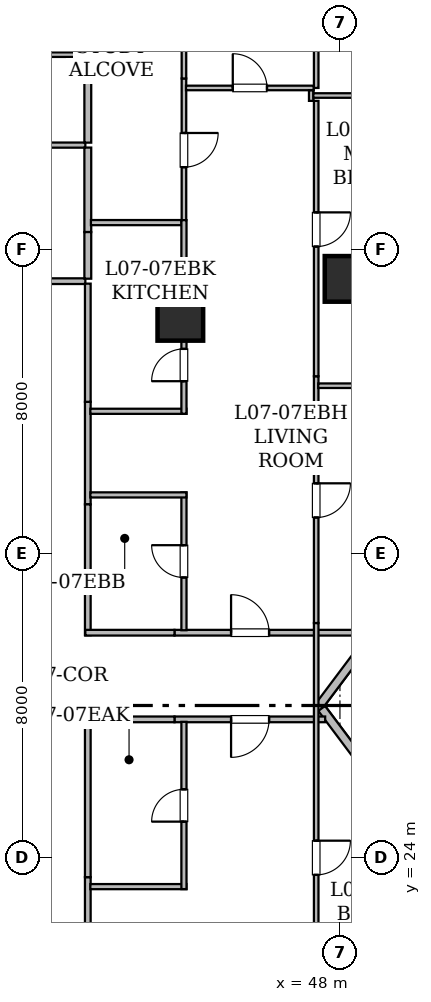
"""IFC4 building model, lengths in metres.
Left out: names, types, materials, properties, quantities, classifications, styles, units other than length and angle.
Written with IfcOpenShell. Run it as: python <this file> out.ifc"""

import sys

from ifc_helpers import new_model, si_unit, direction, frame, frame_2d, origin, origin_2d, place, context, subcontext, project, spatial, rectangle, hollow_rectangle, extrude, element, fill, save


model = new_model("IFC4")
c1 = context("Model", 3, precision=1e-05, world=origin(), true_north=direction((0.0, 1.0)))
c2 = subcontext(c1, "Body", "Model", "MODEL_VIEW")
j1 = project(units=[si_unit("LENGTHUNIT", "METRE"), si_unit("PLANEANGLEUNIT", "RADIAN")], contexts=[c1])
p1 = place(None, origin())
s1 = spatial("IfcSite", under=j1, at=p1, CompositionType="ELEMENT")
p2 = place(p1, origin())
s2 = spatial("IfcBuilding", under=s1, at=p2, CompositionType="ELEMENT")
p3 = place(p2, frame((0.0, 0.0, 33.3)))
s3 = spatial("IfcBuildingStorey", under=s2, at=p3, CompositionType="ELEMENT", Elevation=33.3)
for number, where, z_axis, x_axis in (
    (1, (48.2, 39.225, 0.025), (0.0, 0.0, 1.0), (1.0, 0.0, 0.0)),
    (2, (43.8, 38.2, 0.025), (0.0, 0.0, 1.0), (1.0, 0.0, 0.0)),
):
    element("IfcColumn", number, at=place(p3, frame(where, z_axis=z_axis, x_axis=x_axis)), inside=s3, PredefinedType="COLUMN", context=c2, shape_type="SweptSolid", body=[
        extrude(hollow_rectangle(XDim=1.2, YDim=1.2, WallThickness=0.06, at=origin_2d()), origin(), (0.0, 0.0, 1.0), 3.625),
    ])
p4 = place(p3, frame((49.856, 31.191, 0.0), z_axis=(0.0, 0.0, 1.0), x_axis=(-0.600137081448, -0.799897170561, 0.0)))
e3 = element("IfcWall", 3, at=p4, inside=s3, PredefinedType="STANDARD", context=c2, shape_type="SweptSolid", body=[
    extrude(rectangle(XDim=3.989, YDim=0.22, at=frame_2d((1.995, 0.0))), origin(), (0.0, 0.0, 1.0), 3.43),
])
p5 = place(p3, frame((47.519, 27.923, 0.0), z_axis=(0.0, 0.0, 1.0), x_axis=(0.600118645218, -0.799911002338, 0.0)))
e4 = element("IfcWall", 4, at=p5, inside=s3, PredefinedType="STANDARD", context=c2, shape_type="SweptSolid", body=[
    extrude(rectangle(XDim=3.951, YDim=0.22, at=frame_2d((1.975, 0.0))), origin(), (0.0, 0.0, 1.0), 3.43),
])
p6 = place(p3, frame((34.299, 39.165, 0.0), z_axis=(0.0, 0.0, 1.0), x_axis=(1.0, 0.0, 0.0)))
e5 = element("IfcWall", 5, at=p6, inside=s3, PredefinedType="STANDARD", context=c2, shape_type="SweptSolid", body=[
    extrude(rectangle(XDim=7.001, YDim=0.15, at=frame_2d((3.5, 0.0))), origin(), (0.0, 0.0, 1.0), 3.43),
])
p7 = place(p3, frame((47.611, 27.635, 0.0), z_axis=(0.0, 0.0, 1.0), x_axis=(-1.0, 0.0, 0.0)))
e6 = element("IfcWall", 6, at=p7, inside=s3, PredefinedType="STANDARD", context=c2, shape_type="SweptSolid", body=[
    extrude(rectangle(XDim=3.965, YDim=0.15, at=frame_2d((1.982, 0.0))), origin(), (0.0, 0.0, 1.0), 2.647),
])
p8 = place(p7, frame((1.476, 0.0, 0.0)))
e7 = element("IfcOpeningElement", 7, at=p8, cuts=e6, PredefinedType="OPENING", context=c2, shape_type="SweptSolid", body=[
    extrude(rectangle(XDim=1.0, YDim=2.15, at=frame_2d((0.5, 1.075))), frame((0.0, 0.085, 0.0), z_axis=(0.0, -1.0, 0.0), x_axis=(1.0, 0.0, 0.0)), (0.0, 0.0, 1.0), 0.17),
])
p9 = place(p3, frame((41.365, 23.483, 0.0), z_axis=(0.0, 0.0, 1.0), x_axis=(0.0, -1.0, 0.0)))
e8 = element("IfcWall", 8, at=p9, inside=s3, PredefinedType="STANDARD", context=c2, shape_type="SweptSolid", body=[
    extrude(rectangle(XDim=2.698, YDim=0.15, at=frame_2d((1.349, 0.0))), origin(), (0.0, 0.0, 1.0), 3.43),
])
p10 = place(p3, frame((43.646, 27.635, 0.0), z_axis=(0.0, 0.0, 1.0), x_axis=(-1.0, 0.0, 0.0)))
e9 = element("IfcWall", 9, at=p10, inside=s3, PredefinedType="STANDARD", context=c2, shape_type="SweptSolid", body=[
    extrude(rectangle(XDim=2.346, YDim=0.15, at=frame_2d((1.173, 0.0))), origin(), (0.0, 0.0, 1.0), 2.647),
])
p11 = place(p3, frame((41.365, 27.698, 0.0), z_axis=(0.0, 0.0, 1.0), x_axis=(0.0, -1.0, 0.0)))
e10 = element("IfcWall", 10, at=p11, inside=s3, PredefinedType="STANDARD", context=c2, shape_type="SweptSolid", body=[
    extrude(rectangle(XDim=4.215, YDim=0.15, at=frame_2d((2.107, 0.0))), origin(), (0.0, 0.0, 1.0), 2.957),
])
p12 = place(p3, frame((41.365, 35.99, 0.0), z_axis=(0.0, 0.0, 1.0), x_axis=(0.0, -1.0, 0.0)))
e11 = element("IfcWall", 11, at=p12, inside=s3, PredefinedType="STANDARD", context=c2, shape_type="SweptSolid", body=[
    extrude(rectangle(XDim=2.698, YDim=0.15, at=frame_2d((1.349, 0.0))), origin(), (0.0, 0.0, 1.0), 3.43),
])
p13 = place(p3, frame((43.646, 29.915, 0.0), z_axis=(0.0, 0.0, 1.0), x_axis=(1.0, 0.0, 0.0)))
e12 = element("IfcWall", 12, at=p13, inside=s3, PredefinedType="STANDARD", context=c2, shape_type="SweptSolid", body=[
    extrude(rectangle(XDim=5.125, YDim=0.15, at=frame_2d((2.562, 0.0))), origin(), (0.0, 0.0, 1.0), 2.647),
])
p14 = place(p13, frame((1.489, 0.0, 0.0)))
e13 = element("IfcOpeningElement", 13, at=p14, cuts=e12, PredefinedType="OPENING", context=c2, shape_type="SweptSolid", body=[
    extrude(rectangle(XDim=1.0, YDim=2.15, at=frame_2d((0.5, 1.075))), frame((0.0, 0.085, 0.0), z_axis=(0.0, -1.0, 0.0), x_axis=(1.0, 0.0, 0.0)), (0.0, 0.0, 1.0), 0.17),
])
p15 = place(p3, frame((41.365, 33.292, 0.0), z_axis=(0.0, 0.0, 1.0), x_axis=(0.0, -1.0, 0.0)))
e14 = element("IfcWall", 14, at=p15, inside=s3, PredefinedType="STANDARD", context=c2, shape_type="SweptSolid", body=[
    extrude(rectangle(XDim=3.442, YDim=0.15, at=frame_2d((1.721, 0.0))), origin(), (0.0, 0.0, 1.0), 3.43),
])
p16 = place(p3, frame((41.3, 29.915, 0.0), z_axis=(0.0, 0.0, 1.0), x_axis=(1.0, 0.0, 0.0)))
e15 = element("IfcWall", 15, at=p16, inside=s3, PredefinedType="STANDARD", context=c2, shape_type="SweptSolid", body=[
    extrude(rectangle(XDim=2.346, YDim=0.15, at=frame_2d((1.173, 0.0))), origin(), (0.0, 0.0, 1.0), 2.647),
])
p17 = place(p3, frame((41.365, 39.1, 0.0), z_axis=(0.0, 0.0, 1.0), x_axis=(0.0, -1.0, 0.0)))
e16 = element("IfcWall", 16, at=p17, inside=s3, PredefinedType="STANDARD", context=c2, shape_type="SweptSolid", body=[
    extrude(rectangle(XDim=3.11, YDim=0.15, at=frame_2d((1.555, 0.0))), origin(), (0.0, 0.0, 1.0), 2.647),
])
p18 = place(p3, frame((41.3, 42.745, 0.0), z_axis=(0.0, 0.0, 1.0), x_axis=(-1.0, 0.0, 0.0)))
e17 = element("IfcWall", 17, at=p18, inside=s3, PredefinedType="PARTITIONING", context=c2, shape_type="SweptSolid", body=[
    extrude(rectangle(XDim=7.315, YDim=0.135, at=frame_2d((3.657, 0.0))), origin(), (0.0, 0.0, 1.0), 2.957),
])
p19 = place(p18, frame((3.233, 0.0, 0.0)))
e18 = element("IfcOpeningElement", 18, at=p19, cuts=e17, PredefinedType="OPENING", context=c2, shape_type="SweptSolid", body=[
    extrude(rectangle(XDim=0.85, YDim=2.1, at=frame_2d((0.425, 1.05))), frame((0.0, 0.077, 0.0), z_axis=(0.0, -1.0, 0.0), x_axis=(1.0, 0.0, 0.0)), (0.0, 0.0, 1.0), 0.155),
])
p20 = place(p3, frame((34.82, 45.125, 0.0), z_axis=(0.0, 0.0, 1.0), x_axis=(1.0, 0.0, 0.0)))
e19 = element("IfcWall", 19, at=p20, inside=s3, PredefinedType="PARTITIONING", context=c2, shape_type="SweptSolid", body=[
    extrude(rectangle(XDim=6.48, YDim=0.12, at=frame_2d((3.24, 0.0))), origin(), (0.0, 0.0, 1.0), 3.43),
])
p21 = place(p3, frame((41.365, 45.06, 0.0), z_axis=(0.0, 0.0, 1.0), x_axis=(0.0, -1.0, 0.0)))
e20 = element("IfcWall", 20, at=p21, inside=s3, PredefinedType="STANDARD", context=c2, shape_type="SweptSolid", body=[
    extrude(rectangle(XDim=2.25, YDim=0.18, at=frame_2d((1.125, 0.0))), origin(), (0.0, 0.0, 1.0), 3.43),
])
p22 = place(p3, frame((41.365, 42.68, 0.0), z_axis=(0.0, 0.0, 1.0), x_axis=(0.0, -1.0, 0.0)))
e21 = element("IfcWall", 21, at=p22, inside=s3, PredefinedType="STANDARD", context=c2, shape_type="SweptSolid", body=[
    extrude(rectangle(XDim=2.223, YDim=0.18, at=frame_2d((1.111, 0.0))), origin(), (0.0, 0.0, 1.0), 2.957),
])
p23 = place(p3, frame((41.365, 40.457, 0.0), z_axis=(0.0, 0.0, 1.0), x_axis=(0.0, -1.0, 0.0)))
e22 = element("IfcWall", 22, at=p23, inside=s3, PredefinedType="STANDARD", context=c2, shape_type="SweptSolid", body=[
    extrude(rectangle(XDim=1.227, YDim=0.18, at=frame_2d((0.614, 0.0))), origin(), (0.0, 0.0, 1.0), 3.43),
])
p24 = place(p3, frame((41.432, 23.234, 0.0), z_axis=(0.0, 0.0, 1.0), x_axis=(1.0, 0.0, 0.0)))
e23 = element("IfcWall", 23, at=p24, inside=s3, PredefinedType="PARTITIONING", context=c2, shape_type="SweptSolid", body=[
    extrude(rectangle(XDim=2.528, YDim=0.135, at=frame_2d((1.264, 0.0))), origin(), (0.0, 0.0, 1.0), 2.647),
])
p25 = place(p3, frame((43.895, 23.169, 0.0), z_axis=(0.0, 0.0, 1.0), x_axis=(0.0, 1.0, 0.0)))
e24 = element("IfcWall", 24, at=p25, inside=s3, PredefinedType="PARTITIONING", context=c2, shape_type="SweptSolid", body=[
    extrude(rectangle(XDim=4.401, YDim=0.135, at=frame_2d((2.201, 0.0))), origin(), (0.0, 0.0, 1.0), 2.647),
])
p26 = place(p25, frame((1.775, 0.0, 0.0)))
e25 = element("IfcOpeningElement", 25, at=p26, cuts=e24, PredefinedType="OPENING", context=c2, shape_type="SweptSolid", body=[
    extrude(rectangle(XDim=0.85, YDim=2.1, at=frame_2d((0.425, 1.05))), frame((0.0, 0.077, 0.0), z_axis=(0.0, -1.0, 0.0), x_axis=(1.0, 0.0, 0.0)), (0.0, 0.0, 1.0), 0.155),
])
p27 = place(p3, frame((47.375, 30.17, 0.0), z_axis=(0.0, 0.0, 1.0), x_axis=(0.0, -1.0, 0.0)))
e26 = element("IfcWall", 26, at=p27, inside=s3, PredefinedType="PARTITIONING", context=c2, shape_type="SweptSolid", body=[
    extrude(rectangle(XDim=10.026, YDim=0.12, at=frame_2d((5.013, 0.0))), origin(), (0.0, 0.0, 1.0), 2.957),
])
p28 = place(p27, frame((5.727, 0.0, 0.0)))
e27 = element("IfcOpeningElement", 27, at=p28, cuts=e26, PredefinedType="OPENING", context=c2, shape_type="SweptSolid", body=[
    extrude(rectangle(XDim=0.9, YDim=2.1, at=frame_2d((0.45, 1.05))), frame((0.0, 0.07, 0.0), z_axis=(0.0, -1.0, 0.0), x_axis=(1.0, 0.0, 0.0)), (0.0, 0.0, 1.0), 0.14),
])
p29 = place(p3, frame((43.895, 44.498, 0.0), z_axis=(0.0, 0.0, 1.0), x_axis=(0.0, -1.0, 0.0)))
e28 = element("IfcWall", 28, at=p29, inside=s3, PredefinedType="PARTITIONING", context=c2, shape_type="SweptSolid", body=[
    extrude(rectangle(XDim=3.727, YDim=0.12, at=frame_2d((1.864, 0.0))), origin(), (0.0, 0.0, 1.0), 2.647),
])
p30 = place(p29, frame((1.434, 0.0, 0.0)))
e29 = element("IfcOpeningElement", 29, at=p30, cuts=e28, PredefinedType="OPENING", context=c2, shape_type="SweptSolid", body=[
    extrude(rectangle(XDim=0.9, YDim=2.1, at=frame_2d((0.45, 1.05))), frame((0.0, 0.07, 0.0), z_axis=(0.0, -1.0, 0.0), x_axis=(1.0, 0.0, 0.0)), (0.0, 0.0, 1.0), 0.14),
])
p31 = place(p3, frame((43.895, 52.788, 0.0), z_axis=(0.0, 0.0, 1.0), x_axis=(0.0, -1.0, 0.0)))
e30 = element("IfcWall", 30, at=p31, inside=s3, PredefinedType="PARTITIONING", context=c2, shape_type="SweptSolid", body=[
    extrude(rectangle(XDim=8.29, YDim=0.12, at=frame_2d((4.145, 0.0))), origin(), (0.0, 0.0, 1.0), 2.647),
])
p32 = place(p31, frame((3.695, 0.0, 0.0)))
e31 = element("IfcOpeningElement", 31, at=p32, cuts=e30, PredefinedType="OPENING", context=c2, shape_type="SweptSolid", body=[
    extrude(rectangle(XDim=0.9, YDim=2.1, at=frame_2d((0.45, 1.05))), frame((0.0, 0.07, 0.0), z_axis=(0.0, -1.0, 0.0), x_axis=(1.0, 0.0, 0.0)), (0.0, 0.0, 1.0), 0.14),
])
p33 = place(p3, frame((43.83, 40.706, 0.0), z_axis=(0.0, 0.0, 1.0), x_axis=(-1.0, 0.0, 0.0)))
e32 = element("IfcWall", 32, at=p33, inside=s3, PredefinedType="PARTITIONING", context=c2, shape_type="SweptSolid", body=[
    extrude(rectangle(XDim=2.383, YDim=0.135, at=frame_2d((1.191, 0.0))), origin(), (0.0, 0.0, 1.0), 2.647),
])
p34 = place(p3, frame((43.949, 44.249, 0.0), z_axis=(0.0, 0.0, 1.0), x_axis=(1.0, 0.0, 0.0)))
e33 = element("IfcWall", 33, at=p34, inside=s3, PredefinedType="PARTITIONING", context=c2, shape_type="SweptSolid", body=[
    extrude(rectangle(XDim=3.361, YDim=0.12, at=frame_2d((1.681, 0.0))), origin(), (0.0, 0.0, 1.0), 2.647),
])
p35 = place(p34, frame((1.231, 0.0, 0.0)))
e34 = element("IfcOpeningElement", 34, at=p35, cuts=e33, PredefinedType="OPENING", context=c2, shape_type="SweptSolid", body=[
    extrude(rectangle(XDim=0.9, YDim=2.1, at=frame_2d((0.45, 1.05))), frame((0.0, 0.07, 0.0), z_axis=(0.0, -1.0, 0.0), x_axis=(1.0, 0.0, 0.0)), (0.0, 0.0, 1.0), 0.14),
])
p36 = place(p3, frame((47.245, 44.184, 0.0), z_axis=(0.0, 0.0, 1.0), x_axis=(0.0, -1.0, 0.0)))
e35 = element("IfcWall", 35, at=p36, inside=s3, PredefinedType="PARTITIONING", context=c2, shape_type="SweptSolid", body=[
    extrude(rectangle(XDim=0.275, YDim=0.12, at=frame_2d((0.138, 0.0))), origin(), (0.0, 0.0, 1.0), 3.43),
])
p37 = place(p3, frame((43.895, 29.98, 0.0), z_axis=(0.0, 0.0, 1.0), x_axis=(0.0, 1.0, 0.0)))
e36 = element("IfcWall", 36, at=p37, inside=s3, PredefinedType="PARTITIONING", context=c2, shape_type="SweptSolid", body=[
    extrude(rectangle(XDim=3.626, YDim=0.135, at=frame_2d((1.813, 0.0))), origin(), (0.0, 0.0, 1.0), 2.647),
])
p38 = place(p37, frame((1.388, 0.0, 0.0)))
e37 = element("IfcOpeningElement", 37, at=p38, cuts=e36, PredefinedType="OPENING", context=c2, shape_type="SweptSolid", body=[
    extrude(rectangle(XDim=0.85, YDim=2.1, at=frame_2d((0.425, 1.05))), frame((0.0, 0.077, 0.0), z_axis=(0.0, -1.0, 0.0), x_axis=(1.0, 0.0, 0.0)), (0.0, 0.0, 1.0), 0.155),
])
for number, where, z_axis, x_axis in (
    (38, (43.96, 33.541, 0.0), (0.0, 0.0, 1.0), (-1.0, 0.0, 0.0)),
    (39, (41.432, 35.741, 0.0), (0.0, 0.0, 1.0), (1.0, 0.0, 0.0)),
):
    element("IfcWall", number, at=place(p3, frame(where, z_axis=z_axis, x_axis=x_axis)), inside=s3, PredefinedType="PARTITIONING", context=c2, shape_type="SweptSolid", body=[
        extrude(rectangle(XDim=2.528, YDim=0.135, at=frame_2d((1.264, 0.0))), origin(), (0.0, 0.0, 1.0), 2.647),
    ])
p39 = place(p3, frame((43.895, 35.676, 0.0), z_axis=(0.0, 0.0, 1.0), x_axis=(0.0, 1.0, 0.0)))
e40 = element("IfcWall", 40, at=p39, inside=s3, PredefinedType="PARTITIONING", context=c2, shape_type="SweptSolid", body=[
    extrude(rectangle(XDim=5.095, YDim=0.135, at=frame_2d((2.547, 0.0))), origin(), (0.0, 0.0, 1.0), 2.647),
])
p40 = place(p39, frame((0.857, 0.0, 0.0)))
e41 = element("IfcOpeningElement", 41, at=p40, cuts=e40, PredefinedType="OPENING", context=c2, shape_type="SweptSolid", body=[
    extrude(rectangle(XDim=0.85, YDim=2.1, at=frame_2d((0.425, 1.05))), frame((0.0, 0.077, 0.0), z_axis=(0.0, -1.0, 0.0), x_axis=(1.0, 0.0, 0.0)), (0.0, 0.0, 1.0), 0.155),
])
p41 = place(p3, frame((47.375, 36.663, 0.0), z_axis=(0.0, 0.0, 1.0), x_axis=(0.0, -1.0, 0.0)))
e42 = element("IfcWall", 42, at=p41, inside=s3, PredefinedType="PARTITIONING", context=c2, shape_type="SweptSolid", body=[
    extrude(rectangle(XDim=6.493, YDim=0.12, at=frame_2d((3.247, 0.0))), origin(), (0.0, 0.0, 1.0), 3.43),
])
p42 = place(p41, frame((2.817, 0.0, 0.0)))
e43 = element("IfcOpeningElement", 43, at=p42, cuts=e42, PredefinedType="OPENING", context=c2, shape_type="SweptSolid", body=[
    extrude(rectangle(XDim=0.9, YDim=2.1, at=frame_2d((0.45, 1.05))), frame((0.0, 0.07, 0.0), z_axis=(0.0, -1.0, 0.0), x_axis=(1.0, 0.0, 0.0)), (0.0, 0.0, 1.0), 0.14),
])
p43 = place(p3, frame((47.375, 43.909, 0.0), z_axis=(0.0, 0.0, 1.0), x_axis=(0.0, -1.0, 0.0)))
e44 = element("IfcWall", 44, at=p43, inside=s3, PredefinedType="PARTITIONING", context=c2, shape_type="SweptSolid", body=[
    extrude(rectangle(XDim=7.246, YDim=0.12, at=frame_2d((3.623, 0.0))), origin(), (0.0, 0.0, 1.0), 2.647),
])
p44 = place(p43, frame((2.934, 0.0, 0.0)))
e45 = element("IfcOpeningElement", 45, at=p44, cuts=e44, PredefinedType="OPENING", context=c2, shape_type="SweptSolid", body=[
    extrude(rectangle(XDim=0.9, YDim=2.1, at=frame_2d((0.45, 1.05))), frame((0.0, 0.07, 0.0), z_axis=(0.0, -1.0, 0.0), x_axis=(1.0, 0.0, 0.0)), (0.0, 0.0, 1.0), 0.14),
])
p45 = place(p3, frame((47.375, 51.278, 0.0), z_axis=(0.0, 0.0, 1.0), x_axis=(0.0, -1.0, 0.0)))
e46 = element("IfcWall", 46, at=p45, inside=s3, PredefinedType="PARTITIONING", context=c2, shape_type="SweptSolid", body=[
    extrude(rectangle(XDim=7.029, YDim=0.12, at=frame_2d((3.515, 0.0))), origin(), (0.0, 0.0, 1.0), 3.43),
])
p46 = place(p45, frame((3.064, 0.0, 0.0)))
e47 = element("IfcOpeningElement", 47, at=p46, cuts=e46, PredefinedType="OPENING", context=c2, shape_type="SweptSolid", body=[
    extrude(rectangle(XDim=0.9, YDim=2.1, at=frame_2d((0.45, 1.05))), frame((0.0, 0.07, 0.0), z_axis=(0.0, -1.0, 0.0), x_axis=(1.0, 0.0, 0.0)), (0.0, 0.0, 1.0), 0.14),
])
p47 = place(p3, frame((47.429, 36.414, 0.0), z_axis=(0.0, 0.0, 1.0), x_axis=(1.0, 0.0, 0.0)))
e48 = element("IfcWall", 48, at=p47, inside=s3, PredefinedType="PARTITIONING", context=c2, shape_type="SweptSolid", body=[
    extrude(rectangle(XDim=2.359, YDim=0.12, at=frame_2d((1.18, 0.0))), origin(), (0.0, 0.0, 1.0), 2.803),
])
p48 = place(p3, frame((47.299, 44.05, 0.0), z_axis=(0.0, 0.0, 1.0), x_axis=(1.0, 0.0, 0.0)))
e49 = element("IfcWall", 49, at=p48, inside=s3, PredefinedType="PARTITIONING", context=c2, shape_type="SweptSolid", body=[
    extrude(rectangle(XDim=2.489, YDim=0.12, at=frame_2d((1.245, 0.0))), origin(), (0.0, 0.0, 1.0), 3.43),
])
p49 = place(p8, origin())
e50 = element("IfcDoor", 50, at=p49, inside=s3, OperationType="SINGLE_SWING_RIGHT", PredefinedType="DOOR", context=c2, shape_type="SweptSolid", body=[
    extrude(rectangle(XDim=1.0, YDim=2.15, at=frame_2d((0.5, 1.075))), frame((0.0, 0.025, 0.0), z_axis=(0.0, -1.0, 0.0), x_axis=(1.0, 0.0, 0.0)), (0.0, 0.0, 1.0), 0.05),
])
fill(e7, e50)
p50 = place(p14, origin())
e51 = element("IfcDoor", 51, at=p50, inside=s3, OperationType="SINGLE_SWING_LEFT", PredefinedType="DOOR", context=c2, shape_type="SweptSolid", body=[
    extrude(rectangle(XDim=1.0, YDim=2.15, at=frame_2d((0.5, 1.075))), frame((0.0, 0.025, 0.0), z_axis=(0.0, -1.0, 0.0), x_axis=(1.0, 0.0, 0.0)), (0.0, 0.0, 1.0), 0.05),
])
fill(e13, e51)
p51 = place(p26, origin())
e52 = element("IfcDoor", 52, at=p51, inside=s3, OperationType="SINGLE_SWING_LEFT", PredefinedType="DOOR", context=c2, shape_type="SweptSolid", body=[
    extrude(rectangle(XDim=0.85, YDim=2.1, at=frame_2d((0.425, 1.05))), frame((0.0, 0.025, 0.0), z_axis=(0.0, -1.0, 0.0), x_axis=(1.0, 0.0, 0.0)), (0.0, 0.0, 1.0), 0.05),
])
fill(e25, e52)
p52 = place(p28, origin())
e53 = element("IfcDoor", 53, at=p52, inside=s3, OperationType="SINGLE_SWING_LEFT", PredefinedType="DOOR", context=c2, shape_type="SweptSolid", body=[
    extrude(rectangle(XDim=0.9, YDim=2.1, at=frame_2d((0.45, 1.05))), frame((0.0, 0.025, 0.0), z_axis=(0.0, -1.0, 0.0), x_axis=(1.0, 0.0, 0.0)), (0.0, 0.0, 1.0), 0.05),
])
fill(e27, e53)
p53 = place(p30, origin())
e54 = element("IfcDoor", 54, at=p53, inside=s3, OperationType="SINGLE_SWING_LEFT", PredefinedType="DOOR", context=c2, shape_type="SweptSolid", body=[
    extrude(rectangle(XDim=0.9, YDim=2.1, at=frame_2d((0.45, 1.05))), frame((0.0, 0.025, 0.0), z_axis=(0.0, -1.0, 0.0), x_axis=(1.0, 0.0, 0.0)), (0.0, 0.0, 1.0), 0.05),
])
fill(e29, e54)
p54 = place(p35, origin())
e55 = element("IfcDoor", 55, at=p54, inside=s3, OperationType="SINGLE_SWING_LEFT", PredefinedType="DOOR", context=c2, shape_type="SweptSolid", body=[
    extrude(rectangle(XDim=0.9, YDim=2.1, at=frame_2d((0.45, 1.05))), frame((0.0, 0.025, 0.0), z_axis=(0.0, -1.0, 0.0), x_axis=(1.0, 0.0, 0.0)), (0.0, 0.0, 1.0), 0.05),
])
fill(e34, e55)
p55 = place(p38, origin())
e56 = element("IfcDoor", 56, at=p55, inside=s3, OperationType="SINGLE_SWING_RIGHT", PredefinedType="DOOR", context=c2, shape_type="SweptSolid", body=[
    extrude(rectangle(XDim=0.85, YDim=2.1, at=frame_2d((0.425, 1.05))), frame((0.0, 0.025, 0.0), z_axis=(0.0, -1.0, 0.0), x_axis=(1.0, 0.0, 0.0)), (0.0, 0.0, 1.0), 0.05),
])
fill(e37, e56)
p56 = place(p40, origin())
e57 = element("IfcDoor", 57, at=p56, inside=s3, OperationType="SINGLE_SWING_LEFT", PredefinedType="DOOR", context=c2, shape_type="SweptSolid", body=[
    extrude(rectangle(XDim=0.85, YDim=2.1, at=frame_2d((0.425, 1.05))), frame((0.0, 0.025, 0.0), z_axis=(0.0, -1.0, 0.0), x_axis=(1.0, 0.0, 0.0)), (0.0, 0.0, 1.0), 0.05),
])
fill(e41, e57)
p57 = place(p42, origin())
e58 = element("IfcDoor", 58, at=p57, inside=s3, OperationType="SINGLE_SWING_LEFT", PredefinedType="DOOR", context=c2, shape_type="SweptSolid", body=[
    extrude(rectangle(XDim=0.9, YDim=2.1, at=frame_2d((0.45, 1.05))), frame((0.0, 0.025, 0.0), z_axis=(0.0, -1.0, 0.0), x_axis=(1.0, 0.0, 0.0)), (0.0, 0.0, 1.0), 0.05),
])
fill(e43, e58)
p58 = place(p44, origin())
e59 = element("IfcDoor", 59, at=p58, inside=s3, OperationType="SINGLE_SWING_LEFT", PredefinedType="DOOR", context=c2, shape_type="SweptSolid", body=[
    extrude(rectangle(XDim=0.9, YDim=2.1, at=frame_2d((0.45, 1.05))), frame((0.0, 0.025, 0.0), z_axis=(0.0, -1.0, 0.0), x_axis=(1.0, 0.0, 0.0)), (0.0, 0.0, 1.0), 0.05),
])
fill(e45, e59)
save(model, sys.argv[1])
